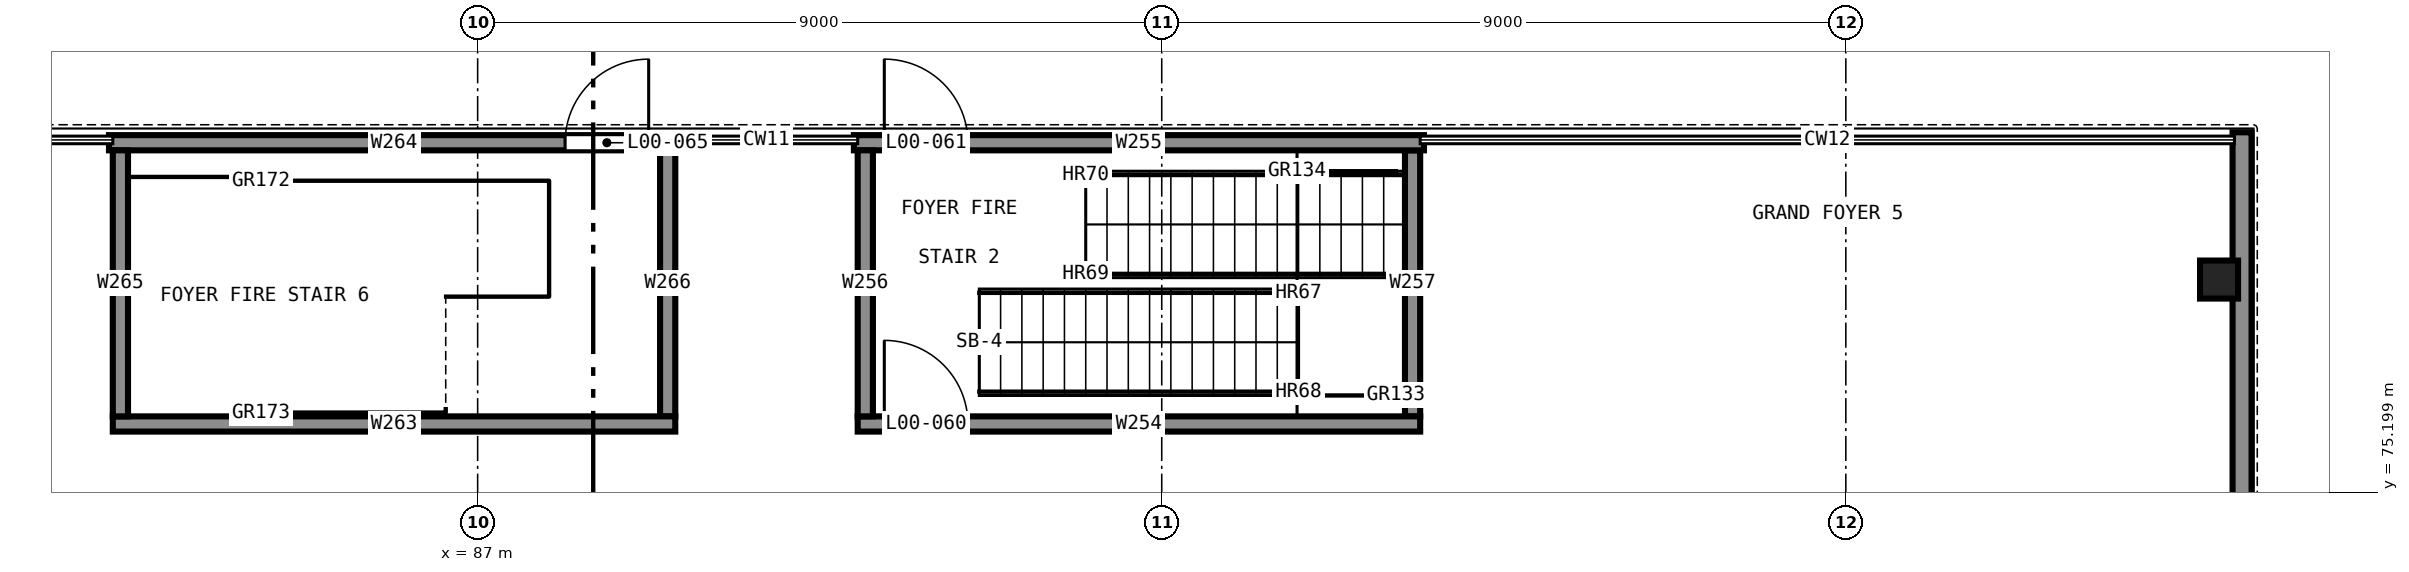
"""IFC4 building model, lengths in metres.
Left out: names, types, materials, properties, quantities, classifications, styles, units other than length and angle.
Written with IfcOpenShell. Run it as: python <this file> out.ifc"""

import sys

from ifc_helpers import new_model, si_unit, direction, frame, frame_2d, origin, origin_2d, place, context, subcontext, project, spatial, rectangle, extrude, element, fill, save


model = new_model("IFC4")
c1 = context("Model", 3, precision=1e-05, world=origin(), true_north=direction((0.0, 1.0)))
c2 = subcontext(c1, "Body", "Model", "MODEL_VIEW")
j1 = project(units=[si_unit("LENGTHUNIT", "METRE"), si_unit("PLANEANGLEUNIT", "RADIAN")], contexts=[c1])
p1 = place(None, origin())
s1 = spatial("IfcSite", under=j1, at=p1, CompositionType="ELEMENT")
p2 = place(p1, origin())
s2 = spatial("IfcBuilding", under=s1, at=p2, CompositionType="ELEMENT")
p3 = place(p2, origin())
s3 = spatial("IfcBuildingStorey", under=s2, at=p3, CompositionType="ELEMENT", Elevation=0.0)
p4 = place(p3, frame((92.0, 76.1, 0.0), z_axis=(0.0, 0.0, 1.0), x_axis=(1.0, 0.0, 0.0)))
e1 = element("IfcWall", 1, at=p4, inside=s3, PredefinedType="SHEAR", context=c2, shape_type="SweptSolid", body=[
    extrude(rectangle(XDim=7.4, YDim=0.2, at=frame_2d((3.7, 0.0))), origin(), (0.0, 0.0, 1.0), 5.5),
])
p5 = place(p4, frame((0.35, 0.0, 0.0)))
e2 = element("IfcOpeningElement", 2, at=p5, cuts=e1, PredefinedType="OPENING", context=c2, shape_type="SweptSolid", body=[
    extrude(rectangle(XDim=1.1, YDim=2.1, at=frame_2d((0.55, 1.05))), frame((0.0, 0.11, 0.0), z_axis=(0.0, -1.0, 0.0), x_axis=(1.0, 0.0, 0.0)), (0.0, 0.0, 1.0), 0.22),
])
p6 = place(p3, frame((99.45, 79.8, 0.0), z_axis=(0.0, 0.0, 1.0), x_axis=(-1.0, 0.0, 0.0)))
e3 = element("IfcWall", 3, at=p6, inside=s3, PredefinedType="SHEAR", context=c2, shape_type="SweptSolid", body=[
    extrude(rectangle(XDim=7.5, YDim=0.2, at=frame_2d((3.75, 0.0))), origin(), (0.0, 0.0, 1.0), 5.5),
])
p7 = place(p6, frame((6.0, 0.0, 0.0)))
e4 = element("IfcOpeningElement", 4, at=p7, cuts=e3, PredefinedType="OPENING", context=c2, shape_type="SweptSolid", body=[
    extrude(rectangle(XDim=1.1, YDim=2.1, at=frame_2d((0.55, 1.05))), frame((0.0, 0.11, 0.0), z_axis=(0.0, -1.0, 0.0), x_axis=(1.0, 0.0, 0.0)), (0.0, 0.0, 1.0), 0.22),
])
for number, where, z_axis, x_axis in (
    (5, (92.1, 79.7, 0.0), (0.0, 0.0, 1.0), (0.0, -1.0, 0.0)),
    (6, (99.3, 76.2, 0.0), (0.0, 0.0, 1.0), (0.0, 1.0, 0.0)),
):
    element("IfcWall", number, at=place(p3, frame(where, z_axis=z_axis, x_axis=x_axis)), inside=s3, PredefinedType="SHEAR", context=c2, shape_type="SweptSolid", body=[
        extrude(rectangle(XDim=3.5, YDim=0.2, at=frame_2d((1.75, 0.0))), origin(), (0.0, 0.0, 1.0), 5.5),
    ])
p8 = place(p3, frame((82.2, 76.1, 0.0), z_axis=(0.0, 0.0, 1.0), x_axis=(1.0, 0.0, 0.0)))
e7 = element("IfcWall", 7, at=p8, inside=s3, PredefinedType="SHEAR", context=c2, shape_type="SweptSolid", body=[
    extrude(rectangle(XDim=7.4, YDim=0.2, at=frame_2d((3.7, 0.0))), origin(), (0.0, 0.0, 1.0), 5.2),
])
p9 = place(p3, frame((89.65, 79.8, 0.0), z_axis=(0.0, 0.0, 1.0), x_axis=(-1.0, 0.0, 0.0)))
e8 = element("IfcWall", 8, at=p9, inside=s3, PredefinedType="SHEAR", context=c2, shape_type="SweptSolid", body=[
    extrude(rectangle(XDim=7.5, YDim=0.2, at=frame_2d((3.75, 0.0))), origin(), (0.0, 0.0, 1.0), 5.2),
])
p10 = place(p9, frame((0.4, 0.0, 0.0)))
e9 = element("IfcOpeningElement", 9, at=p10, cuts=e8, PredefinedType="OPENING", context=c2, shape_type="SweptSolid", body=[
    extrude(rectangle(XDim=1.1, YDim=2.1, at=frame_2d((0.55, 1.05))), frame((0.0, 0.11, 0.0), z_axis=(0.0, -1.0, 0.0), x_axis=(1.0, 0.0, 0.0)), (0.0, 0.0, 1.0), 0.22),
])
for number, where, z_axis, x_axis in (
    (10, (82.3, 79.7, 0.0), (0.0, 0.0, 1.0), (0.0, -1.0, 0.0)),
    (11, (89.5, 76.2, 0.0), (0.0, 0.0, 1.0), (0.0, 1.0, 0.0)),
):
    element("IfcWall", number, at=place(p3, frame(where, z_axis=z_axis, x_axis=x_axis)), inside=s3, PredefinedType="SHEAR", context=c2, shape_type="SweptSolid", body=[
        extrude(rectangle(XDim=3.5, YDim=0.2, at=frame_2d((1.75, 0.0))), origin(), (0.0, 0.0, 1.0), 5.2),
    ])
p11 = place(p3, frame((109.91, 78.0, 0.0), z_axis=(0.0, 0.0, 1.0), x_axis=(1.0, 0.0, 0.0)))
e12 = element("IfcColumn", 12, at=p11, inside=s3, PredefinedType="COLUMN", context=c2, shape_type="SweptSolid", body=[
    extrude(rectangle(XDim=0.5, YDim=0.5, at=origin_2d()), origin(), (0.0, 0.0, 1.0), 5.5),
])
p12 = place(p3, frame((110.213, 59.4, 0.0), z_axis=(0.0, 0.0, 1.0), x_axis=(0.0, 1.0, 0.0)))
e13 = element("IfcWall", 13, at=p12, inside=s3, PredefinedType="SOLIDWALL", context=c2, shape_type="SweptSolid", body=[
    extrude(rectangle(XDim=20.537, YDim=0.25, at=frame_2d((10.269, 0.0))), origin(), (0.0, 0.0, 1.0), 5.2),
])
p13 = place(p12, frame((2.6, 0.0, 0.0)))
e14 = element("IfcOpeningElement", 14, at=p13, cuts=e13, PredefinedType="OPENING", context=c2, shape_type="SweptSolid", body=[
    extrude(rectangle(XDim=2.0, YDim=2.1, at=frame_2d((1.0, 1.05))), frame((0.0, 0.135, 0.0), z_axis=(0.0, -1.0, 0.0), x_axis=(1.0, 0.0, 0.0)), (0.0, 0.0, 1.0), 0.27),
])
p14 = place(p12, frame((8.6, 0.0, 0.0)))
e15 = element("IfcOpeningElement", 15, at=p14, cuts=e13, PredefinedType="OPENING", context=c2, shape_type="SweptSolid", body=[
    extrude(rectangle(XDim=2.0, YDim=2.1, at=frame_2d((1.0, 1.05))), frame((0.0, 0.135, 0.0), z_axis=(0.0, -1.0, 0.0), x_axis=(1.0, 0.0, 0.0)), (0.0, 0.0, 1.0), 0.27),
])
p15 = place(p5, origin())
e16 = element("IfcDoor", 16, at=p15, inside=s3, OperationType="SINGLE_SWING_RIGHT", PredefinedType="DOOR", context=c2, shape_type="SweptSolid", body=[
    extrude(rectangle(XDim=1.1, YDim=2.1, at=frame_2d((0.55, 1.05))), frame((0.0, 0.025, 0.0), z_axis=(0.0, -1.0, 0.0), x_axis=(1.0, 0.0, 0.0)), (0.0, 0.0, 1.0), 0.05),
])
fill(e2, e16)
p16 = place(p7, frame((1.1, 0.0, 0.0), z_axis=(0.0, 0.0, 1.0), x_axis=(-1.0, 0.0, 0.0)))
e17 = element("IfcDoor", 17, at=p16, inside=s3, OperationType="SINGLE_SWING_RIGHT", PredefinedType="DOOR", context=c2, shape_type="SweptSolid", body=[
    extrude(rectangle(XDim=1.1, YDim=2.1, at=frame_2d((0.55, 1.05))), frame((0.0, 0.025, 0.0), z_axis=(0.0, -1.0, 0.0), x_axis=(1.0, 0.0, 0.0)), (0.0, 0.0, 1.0), 0.05),
])
fill(e4, e17)
p17 = place(p10, frame((1.1, 0.0, 0.0), z_axis=(0.0, 0.0, 1.0), x_axis=(-1.0, 0.0, 0.0)))
e18 = element("IfcDoor", 18, at=p17, inside=s3, OperationType="SINGLE_SWING_LEFT", PredefinedType="DOOR", context=c2, shape_type="SweptSolid", body=[
    extrude(rectangle(XDim=1.1, YDim=2.1, at=frame_2d((0.55, 1.05))), frame((0.0, 0.025, 0.0), z_axis=(0.0, -1.0, 0.0), x_axis=(1.0, 0.0, 0.0)), (0.0, 0.0, 1.0), 0.05),
])
fill(e9, e18)
save(model, sys.argv[1])
